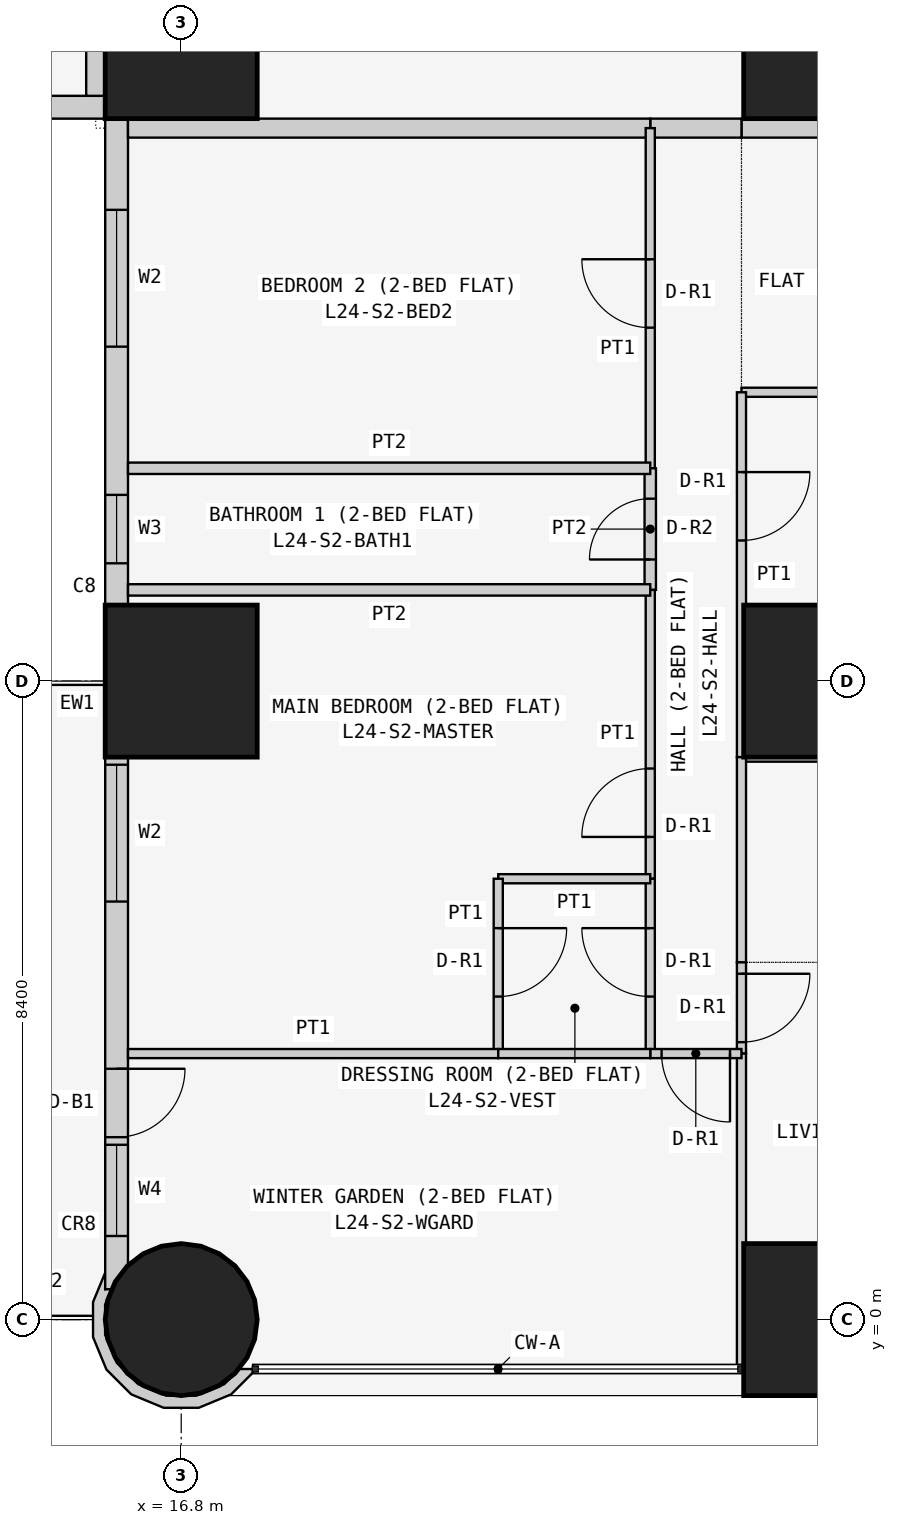
"""IFC4 building model, lengths in metres.
Left out: names, types, materials, properties, quantities, classifications, styles, units other than length and angle.
Written with IfcOpenShell. Run it as: python <this file> out.ifc"""

import sys

from ifc_helpers import new_model, si_unit, direction, frame, frame_2d, origin, origin_2d, place, context, subcontext, project, spatial, polyline, rectangle, circle, outline, extrude, element, fill, save


model = new_model("IFC4")
c1 = context("Model", 3, precision=1e-05, world=origin(), true_north=direction((0.0, 1.0)))
c2 = subcontext(c1, "Body", "Model", "MODEL_VIEW")
j1 = project(units=[si_unit("LENGTHUNIT", "METRE"), si_unit("PLANEANGLEUNIT", "RADIAN")], contexts=[c1])
p1 = place(None, origin())
s1 = spatial("IfcSite", under=j1, at=p1, CompositionType="ELEMENT")
p2 = place(p1, origin())
s2 = spatial("IfcBuilding", under=s1, at=p2, CompositionType="ELEMENT")
p3 = place(p2, frame((0.0, 0.0, 95.7)))
s3 = spatial("IfcBuildingStorey", under=s2, at=p3, CompositionType="ELEMENT", Elevation=95.7)
p4 = place(p3, frame((16.8, 0.0, 0.0), z_axis=(0.0, 0.0, 1.0), x_axis=(1.0, 0.0, 0.0)))
e1 = element("IfcColumn", 1, at=p4, inside=s3, PredefinedType="COLUMN", context=c2, shape_type="SweptSolid", body=[
    extrude(circle(Radius=1.0, at=origin_2d()), origin(), (0.0, 0.0, 1.0), 3.6),
])
for number, where, z_axis, x_axis in (
    (2, (16.8, 8.4, 0.0), (0.0, 0.0, 1.0), (1.0, 0.0, 0.0)),
    (3, (16.8, 16.8, 0.0), (0.0, 0.0, 1.0), (1.0, 0.0, 0.0)),
    (4, (25.2, 0.0, 0.0), (0.0, 0.0, 1.0), (1.0, 0.0, 0.0)),
    (5, (25.2, 8.4, 0.0), (0.0, 0.0, 1.0), (1.0, 0.0, 0.0)),
    (6, (25.2, 16.8, 0.0), (0.0, 0.0, 1.0), (1.0, 0.0, 0.0)),
):
    element("IfcColumn", number, at=place(p3, frame(where, z_axis=z_axis, x_axis=x_axis)), inside=s3, PredefinedType="COLUMN", context=c2, shape_type="SweptSolid", body=[
        extrude(rectangle(XDim=2.0, YDim=2.0, at=origin_2d()), origin(), (0.0, 0.0, 1.0), 3.6),
    ])
p5 = place(p3, frame((0.4, 15.95, 0.0), z_axis=(0.0, 0.0, 1.0), x_axis=(1.0, 0.0, 0.0)))
e7 = element("IfcWall", 7, at=p5, inside=s3, PredefinedType="SOLIDWALL", context=c2, shape_type="SweptSolid", body=[
    extrude(rectangle(XDim=15.7, YDim=0.3, at=frame_2d((7.85, 0.0))), origin(), (0.0, 0.0, 1.0), 3.45),
])
p6 = place(p5, frame((12.4, 0.0, 0.9)))
e8 = element("IfcOpeningElement", 8, at=p6, cuts=e7, PredefinedType="OPENING", context=c2, shape_type="SweptSolid", body=[
    extrude(rectangle(XDim=1.8, YDim=1.5, at=frame_2d((0.9, 0.75))), frame((0.0, 0.16, 0.0), z_axis=(0.0, -1.0, 0.0), x_axis=(1.0, 0.0, 0.0)), (0.0, 0.0, 1.0), 0.32),
])
p7 = place(p5, frame((9.55, 0.0, 1.5)))
e9 = element("IfcOpeningElement", 9, at=p7, cuts=e7, PredefinedType="OPENING", context=c2, shape_type="SweptSolid", body=[
    extrude(rectangle(XDim=0.9, YDim=0.7, at=frame_2d((0.45, 0.35))), frame((0.0, 0.16, 0.0), z_axis=(0.0, -1.0, 0.0), x_axis=(1.0, 0.0, 0.0)), (0.0, 0.0, 1.0), 0.32),
])
p8 = place(p5, frame((5.1, 0.0, 0.9)))
e10 = element("IfcOpeningElement", 10, at=p8, cuts=e7, PredefinedType="OPENING", context=c2, shape_type="SweptSolid", body=[
    extrude(rectangle(XDim=1.8, YDim=1.5, at=frame_2d((0.9, 0.75))), frame((0.0, 0.16, 0.0), z_axis=(0.0, -1.0, 0.0), x_axis=(1.0, 0.0, 0.0)), (0.0, 0.0, 1.0), 0.32),
])
p9 = place(p5, frame((2.0, 0.0, 0.0)))
e11 = element("IfcOpeningElement", 11, at=p9, cuts=e7, PredefinedType="OPENING", context=c2, shape_type="SweptSolid", body=[
    extrude(rectangle(XDim=0.9, YDim=2.4, at=frame_2d((0.45, 1.2))), frame((0.0, 0.16, 0.0), z_axis=(0.0, -1.0, 0.0), x_axis=(1.0, 0.0, 0.0)), (0.0, 0.0, 1.0), 0.32),
])
p10 = place(p5, frame((0.7, 0.0, 0.9)))
e12 = element("IfcOpeningElement", 12, at=p10, cuts=e7, PredefinedType="OPENING", context=c2, shape_type="SweptSolid", body=[
    extrude(rectangle(XDim=1.2, YDim=1.5, at=frame_2d((0.6, 0.75))), frame((0.0, 0.16, 0.0), z_axis=(0.0, -1.0, 0.0), x_axis=(1.0, 0.0, 0.0)), (0.0, 0.0, 1.0), 0.32),
])
p11 = place(p3, frame((15.95, 15.8, 0.0), z_axis=(0.0, 0.0, 1.0), x_axis=(0.0, -1.0, 0.0)))
e13 = element("IfcWall", 13, at=p11, inside=s3, PredefinedType="SOLIDWALL", context=c2, shape_type="SweptSolid", body=[
    extrude(rectangle(XDim=15.4, YDim=0.3, at=frame_2d((7.7, 0.0))), origin(), (0.0, 0.0, 1.0), 3.45),
])
p12 = place(p11, frame((1.2, 0.0, 0.9)))
e14 = element("IfcOpeningElement", 14, at=p12, cuts=e13, PredefinedType="OPENING", context=c2, shape_type="SweptSolid", body=[
    extrude(rectangle(XDim=1.8, YDim=1.5, at=frame_2d((0.9, 0.75))), frame((0.0, 0.16, 0.0), z_axis=(0.0, -1.0, 0.0), x_axis=(1.0, 0.0, 0.0)), (0.0, 0.0, 1.0), 0.32),
])
p13 = place(p11, frame((4.95, 0.0, 1.5)))
e15 = element("IfcOpeningElement", 15, at=p13, cuts=e13, PredefinedType="OPENING", context=c2, shape_type="SweptSolid", body=[
    extrude(rectangle(XDim=0.9, YDim=0.7, at=frame_2d((0.45, 0.35))), frame((0.0, 0.16, 0.0), z_axis=(0.0, -1.0, 0.0), x_axis=(1.0, 0.0, 0.0)), (0.0, 0.0, 1.0), 0.32),
])
p14 = place(p11, frame((8.5, 0.0, 0.9)))
e16 = element("IfcOpeningElement", 16, at=p14, cuts=e13, PredefinedType="OPENING", context=c2, shape_type="SweptSolid", body=[
    extrude(rectangle(XDim=1.8, YDim=1.5, at=frame_2d((0.9, 0.75))), frame((0.0, 0.16, 0.0), z_axis=(0.0, -1.0, 0.0), x_axis=(1.0, 0.0, 0.0)), (0.0, 0.0, 1.0), 0.32),
])
p15 = place(p11, frame((12.5, 0.0, 0.0)))
e17 = element("IfcOpeningElement", 17, at=p15, cuts=e13, PredefinedType="OPENING", context=c2, shape_type="SweptSolid", body=[
    extrude(rectangle(XDim=0.9, YDim=2.4, at=frame_2d((0.45, 1.2))), frame((0.0, 0.16, 0.0), z_axis=(0.0, -1.0, 0.0), x_axis=(1.0, 0.0, 0.0)), (0.0, 0.0, 1.0), 0.32),
])
p16 = place(p11, frame((13.5, 0.0, 0.9)))
e18 = element("IfcOpeningElement", 18, at=p16, cuts=e13, PredefinedType="OPENING", context=c2, shape_type="SweptSolid", body=[
    extrude(rectangle(XDim=1.2, YDim=1.5, at=frame_2d((0.6, 0.75))), frame((0.0, 0.16, 0.0), z_axis=(0.0, -1.0, 0.0), x_axis=(1.0, 0.0, 0.0)), (0.0, 0.0, 1.0), 0.32),
])
p17 = place(p3, frame((15.881, 0.567, 0.0), z_axis=(0.0, 0.0, 1.0), x_axis=(-0.555974394895, -0.831199417842, 0.0)))
e19 = element("IfcWall", 19, at=p17, inside=s3, PredefinedType="SOLIDWALL", context=c2, shape_type="SweptSolid", body=[
    extrude(outline(polyline([(0.075, 2.077), (0.351, 2.022), (0.682, 1.801), (0.903, 1.47), (0.981, 1.08), (0.903, 0.689), (0.682, 0.358), (0.351, 0.137), (0.126, 0.092), (0.184, 0.026), (0.004, -0.095), (0.414, -0.013), (0.797, 0.243), (1.053, 0.627), (1.143, 1.08), (1.053, 1.532), (0.796, 1.916), (0.412, 2.172), (0.017, 2.251), (-0.023, 2.224), (0.075, 2.077)])), origin(), (0.0, 0.0, 1.0), 3.45),
])
p18 = place(p3, frame((29.4, 15.675, 0.0), z_axis=(0.0, 0.0, 1.0), x_axis=(-1.0, 0.0, 0.0)))
e20 = element("IfcWall", 20, at=p18, inside=s3, PredefinedType="PARTITIONING", context=c2, shape_type="SweptSolid", body=[
    extrude(rectangle(XDim=5.229, YDim=0.25, at=frame_2d((2.615, 0.0))), origin(), (0.0, 0.0, 1.0), 3.45),
])
p19 = place(p18, frame((2.05, 0.0, 0.0)))
e21 = element("IfcOpeningElement", 21, at=p19, cuts=e20, PredefinedType="OPENING", context=c2, shape_type="SweptSolid", body=[
    extrude(rectangle(XDim=1.0, YDim=2.1, at=frame_2d((0.5, 1.05))), frame((0.0, 0.135, 0.0), z_axis=(0.0, -1.0, 0.0), x_axis=(1.0, 0.0, 0.0)), (0.0, 0.0, 1.0), 0.27),
])
p20 = place(p3, frame((24.171, 15.675, 0.0), z_axis=(0.0, 0.0, 1.0), x_axis=(-1.0, 0.0, 0.0)))
e22 = element("IfcWall", 22, at=p20, inside=s3, PredefinedType="PARTITIONING", context=c2, shape_type="SweptSolid", body=[
    extrude(rectangle(XDim=1.2, YDim=0.25, at=frame_2d((0.6, 0.0))), origin(), (0.0, 0.0, 1.0), 3.45),
])
p21 = place(p3, frame((22.971, 15.675, 0.0), z_axis=(0.0, 0.0, 1.0), x_axis=(-1.0, 0.0, 0.0)))
e23 = element("IfcWall", 23, at=p21, inside=s3, PredefinedType="PARTITIONING", context=c2, shape_type="SweptSolid", body=[
    extrude(rectangle(XDim=6.871, YDim=0.25, at=frame_2d((3.436, 0.0))), origin(), (0.0, 0.0, 1.0), 3.45),
])
p22 = place(p3, frame((15.675, 16.1, 0.0), z_axis=(0.0, 0.0, 1.0), x_axis=(0.0, 1.0, 0.0)))
e24 = element("IfcWall", 24, at=p22, inside=s3, PredefinedType="PARTITIONING", context=c2, shape_type="SweptSolid", body=[
    extrude(rectangle(XDim=6.471, YDim=0.25, at=frame_2d((3.235, 0.0))), origin(), (0.0, 0.0, 1.0), 3.45),
])
for number, where, z_axis, x_axis in (
    (25, (29.4, 12.2, 0.0), (0.0, 0.0, 1.0), (-1.0, 0.0, 0.0)),
    (26, (29.4, 7.4, 0.0), (0.0, 0.0, 1.0), (-1.0, 0.0, 0.0)),
):
    element("IfcWall", number, at=place(p3, frame(where, z_axis=z_axis, x_axis=x_axis)), inside=s3, PredefinedType="PARTITIONING", context=c2, shape_type="SweptSolid", body=[
        extrude(rectangle(XDim=5.229, YDim=0.12, at=frame_2d((2.615, 0.0))), origin(), (0.0, 0.0, 1.0), 3.45),
    ])
p23 = place(p3, frame((24.171, 7.4, 0.0), z_axis=(0.0, 0.0, 1.0), x_axis=(0.0, 1.0, 0.0)))
e27 = element("IfcWall", 27, at=p23, inside=s3, PredefinedType="PARTITIONING", context=c2, shape_type="SweptSolid", body=[
    extrude(rectangle(XDim=4.8, YDim=0.12, at=frame_2d((2.4, 0.0))), origin(), (0.0, 0.0, 1.0), 3.45),
])
p24 = place(p23, frame((2.85, 0.0, 0.0)))
e28 = element("IfcOpeningElement", 28, at=p24, cuts=e27, PredefinedType="OPENING", context=c2, shape_type="SweptSolid", body=[
    extrude(rectangle(XDim=0.9, YDim=2.1, at=frame_2d((0.45, 1.05))), frame((0.0, 0.07, 0.0), z_axis=(0.0, -1.0, 0.0), x_axis=(1.0, 0.0, 0.0)), (0.0, 0.0, 1.0), 0.14),
])
p25 = place(p3, frame((24.171, 4.7, 0.0), z_axis=(0.0, 0.0, 1.0), x_axis=(0.0, 1.0, 0.0)))
e29 = element("IfcWall", 29, at=p25, inside=s3, PredefinedType="PARTITIONING", context=c2, shape_type="SweptSolid", body=[
    extrude(rectangle(XDim=2.7, YDim=0.12, at=frame_2d((1.35, 0.0))), origin(), (0.0, 0.0, 1.0), 3.45),
])
p26 = place(p3, frame((24.171, 3.5, 0.0), z_axis=(0.0, 0.0, 1.0), x_axis=(0.0, 1.0, 0.0)))
e30 = element("IfcWall", 30, at=p26, inside=s3, PredefinedType="PARTITIONING", context=c2, shape_type="SweptSolid", body=[
    extrude(rectangle(XDim=1.2, YDim=0.12, at=frame_2d((0.6, 0.0))), origin(), (0.0, 0.0, 1.0), 3.45),
])
p27 = place(p26, frame((0.15, 0.0, 0.0)))
e31 = element("IfcOpeningElement", 31, at=p27, cuts=e30, PredefinedType="OPENING", context=c2, shape_type="SweptSolid", body=[
    extrude(rectangle(XDim=0.9, YDim=2.1, at=frame_2d((0.45, 1.05))), frame((0.0, 0.07, 0.0), z_axis=(0.0, -1.0, 0.0), x_axis=(1.0, 0.0, 0.0)), (0.0, 0.0, 1.0), 0.14),
])
p28 = place(p3, frame((24.171, -0.65, 0.0), z_axis=(0.0, 0.0, 1.0), x_axis=(0.0, 1.0, 0.0)))
e32 = element("IfcWall", 32, at=p28, inside=s3, PredefinedType="PARTITIONING", context=c2, shape_type="SweptSolid", body=[
    extrude(rectangle(XDim=4.15, YDim=0.12, at=frame_2d((2.075, 0.0))), origin(), (0.0, 0.0, 1.0), 3.45),
])
p29 = place(p3, frame((22.971, 11.2, 0.0), z_axis=(0.0, 0.0, 1.0), x_axis=(0.0, 1.0, 0.0)))
e33 = element("IfcWall", 33, at=p29, inside=s3, PredefinedType="PARTITIONING", context=c2, shape_type="SweptSolid", body=[
    extrude(rectangle(XDim=4.475, YDim=0.12, at=frame_2d((2.238, 0.0))), origin(), (0.0, 0.0, 1.0), 3.45),
])
p30 = place(p29, frame((1.85, 0.0, 0.0)))
e34 = element("IfcOpeningElement", 34, at=p30, cuts=e33, PredefinedType="OPENING", context=c2, shape_type="SweptSolid", body=[
    extrude(rectangle(XDim=0.9, YDim=2.1, at=frame_2d((0.45, 1.05))), frame((0.0, 0.07, 0.0), z_axis=(0.0, -1.0, 0.0), x_axis=(1.0, 0.0, 0.0)), (0.0, 0.0, 1.0), 0.14),
])
p31 = place(p3, frame((22.971, 9.6, 0.0), z_axis=(0.0, 0.0, 1.0), x_axis=(0.0, 1.0, 0.0)))
e35 = element("IfcWall", 35, at=p31, inside=s3, PredefinedType="PARTITIONING", context=c2, shape_type="SweptSolid", body=[
    extrude(rectangle(XDim=1.6, YDim=0.15, at=frame_2d((0.8, 0.0))), origin(), (0.0, 0.0, 1.0), 3.45),
])
p32 = place(p31, frame((0.4, 0.0, 0.0)))
e36 = element("IfcOpeningElement", 36, at=p32, cuts=e35, PredefinedType="OPENING", context=c2, shape_type="SweptSolid", body=[
    extrude(rectangle(XDim=0.8, YDim=2.1, at=frame_2d((0.4, 1.05))), frame((0.0, 0.085, 0.0), z_axis=(0.0, -1.0, 0.0), x_axis=(1.0, 0.0, 0.0)), (0.0, 0.0, 1.0), 0.17),
])
p33 = place(p3, frame((22.971, 5.8, 0.0), z_axis=(0.0, 0.0, 1.0), x_axis=(0.0, 1.0, 0.0)))
e37 = element("IfcWall", 37, at=p33, inside=s3, PredefinedType="PARTITIONING", context=c2, shape_type="SweptSolid", body=[
    extrude(rectangle(XDim=3.8, YDim=0.12, at=frame_2d((1.9, 0.0))), origin(), (0.0, 0.0, 1.0), 3.45),
])
p34 = place(p33, frame((0.55, 0.0, 0.0)))
e38 = element("IfcOpeningElement", 38, at=p34, cuts=e37, PredefinedType="OPENING", context=c2, shape_type="SweptSolid", body=[
    extrude(rectangle(XDim=0.9, YDim=2.1, at=frame_2d((0.45, 1.05))), frame((0.0, 0.07, 0.0), z_axis=(0.0, -1.0, 0.0), x_axis=(1.0, 0.0, 0.0)), (0.0, 0.0, 1.0), 0.14),
])
p35 = place(p3, frame((22.971, 3.5, 0.0), z_axis=(0.0, 0.0, 1.0), x_axis=(0.0, 1.0, 0.0)))
e39 = element("IfcWall", 39, at=p35, inside=s3, PredefinedType="PARTITIONING", context=c2, shape_type="SweptSolid", body=[
    extrude(rectangle(XDim=2.3, YDim=0.12, at=frame_2d((1.15, 0.0))), origin(), (0.0, 0.0, 1.0), 3.45),
])
p36 = place(p35, frame((0.75, 0.0, 0.0)))
e40 = element("IfcOpeningElement", 40, at=p36, cuts=e39, PredefinedType="OPENING", context=c2, shape_type="SweptSolid", body=[
    extrude(rectangle(XDim=0.9, YDim=2.1, at=frame_2d((0.45, 1.05))), frame((0.0, 0.07, 0.0), z_axis=(0.0, -1.0, 0.0), x_axis=(1.0, 0.0, 0.0)), (0.0, 0.0, 1.0), 0.14),
])
p37 = place(p3, frame((24.171, 3.5, 0.0), z_axis=(0.0, 0.0, 1.0), x_axis=(-1.0, 0.0, 0.0)))
e41 = element("IfcWall", 41, at=p37, inside=s3, PredefinedType="PARTITIONING", context=c2, shape_type="SweptSolid", body=[
    extrude(rectangle(XDim=1.2, YDim=0.12, at=frame_2d((0.6, 0.0))), origin(), (0.0, 0.0, 1.0), 3.45),
])
p38 = place(p37, frame((0.151, 0.0, 0.0)))
e42 = element("IfcOpeningElement", 42, at=p38, cuts=e41, PredefinedType="OPENING", context=c2, shape_type="SweptSolid", body=[
    extrude(rectangle(XDim=0.9, YDim=2.1, at=frame_2d((0.45, 1.05))), frame((0.0, 0.07, 0.0), z_axis=(0.0, -1.0, 0.0), x_axis=(1.0, 0.0, 0.0)), (0.0, 0.0, 1.0), 0.14),
])
for number, where, z_axis, x_axis in (
    (43, (22.971, 11.2, 0.0), (0.0, 0.0, 1.0), (-1.0, 0.0, 0.0)),
    (44, (22.971, 9.6, 0.0), (0.0, 0.0, 1.0), (-1.0, 0.0, 0.0)),
):
    element("IfcWall", number, at=place(p3, frame(where, z_axis=z_axis, x_axis=x_axis)), inside=s3, PredefinedType="PARTITIONING", context=c2, shape_type="SweptSolid", body=[
        extrude(rectangle(XDim=6.871, YDim=0.15, at=frame_2d((3.436, 0.0))), origin(), (0.0, 0.0, 1.0), 3.45),
    ])
p39 = place(p3, frame((22.971, 5.8, 0.0), z_axis=(0.0, 0.0, 1.0), x_axis=(-1.0, 0.0, 0.0)))
e45 = element("IfcWall", 45, at=p39, inside=s3, PredefinedType="PARTITIONING", context=c2, shape_type="SweptSolid", body=[
    extrude(rectangle(XDim=2.0, YDim=0.12, at=frame_2d((1.0, 0.0))), origin(), (0.0, 0.0, 1.0), 3.45),
])
p40 = place(p3, frame((20.971, 5.8, 0.0), z_axis=(0.0, 0.0, 1.0), x_axis=(0.0, -1.0, 0.0)))
e46 = element("IfcWall", 46, at=p40, inside=s3, PredefinedType="PARTITIONING", context=c2, shape_type="SweptSolid", body=[
    extrude(rectangle(XDim=2.3, YDim=0.12, at=frame_2d((1.15, 0.0))), origin(), (0.0, 0.0, 1.0), 2.848),
])
p41 = place(p40, frame((0.65, 0.0, 0.0)))
e47 = element("IfcOpeningElement", 47, at=p41, cuts=e46, PredefinedType="OPENING", context=c2, shape_type="SweptSolid", body=[
    extrude(rectangle(XDim=0.9, YDim=2.1, at=frame_2d((0.45, 1.05))), frame((0.0, 0.07, 0.0), z_axis=(0.0, -1.0, 0.0), x_axis=(1.0, 0.0, 0.0)), (0.0, 0.0, 1.0), 0.14),
])
p42 = place(p3, frame((20.971, 3.5, 0.0), z_axis=(0.0, 0.0, 1.0), x_axis=(-1.0, 0.0, 0.0)))
e48 = element("IfcWall", 48, at=p42, inside=s3, PredefinedType="PARTITIONING", context=c2, shape_type="SweptSolid", body=[
    extrude(rectangle(XDim=4.871, YDim=0.12, at=frame_2d((2.436, 0.0))), origin(), (0.0, 0.0, 1.0), 3.45),
])
p43 = place(p3, frame((22.971, 3.5, 0.0), z_axis=(0.0, 0.0, 1.0), x_axis=(-1.0, 0.0, 0.0)))
e49 = element("IfcWall", 49, at=p43, inside=s3, PredefinedType="PARTITIONING", context=c2, shape_type="SweptSolid", body=[
    extrude(rectangle(XDim=2.0, YDim=0.12, at=frame_2d((1.0, 0.0))), origin(), (0.0, 0.0, 1.0), 3.45),
])
p44 = place(p12, origin())
e50 = element("IfcWindow", 50, at=p44, inside=s3, PartitioningType="SINGLE_PANEL", PredefinedType="WINDOW", context=c2, shape_type="SweptSolid", body=[
    extrude(rectangle(XDim=1.8, YDim=1.5, at=frame_2d((0.9, 0.75))), frame((0.0, 0.03, 0.0), z_axis=(0.0, -1.0, 0.0), x_axis=(1.0, 0.0, 0.0)), (0.0, 0.0, 1.0), 0.06),
])
fill(e14, e50)
p45 = place(p13, origin())
e51 = element("IfcWindow", 51, at=p45, inside=s3, PartitioningType="SINGLE_PANEL", PredefinedType="WINDOW", context=c2, shape_type="SweptSolid", body=[
    extrude(rectangle(XDim=0.9, YDim=0.7, at=frame_2d((0.45, 0.35))), frame((0.0, 0.03, 0.0), z_axis=(0.0, -1.0, 0.0), x_axis=(1.0, 0.0, 0.0)), (0.0, 0.0, 1.0), 0.06),
])
fill(e15, e51)
p46 = place(p14, origin())
e52 = element("IfcWindow", 52, at=p46, inside=s3, PartitioningType="SINGLE_PANEL", PredefinedType="WINDOW", context=c2, shape_type="SweptSolid", body=[
    extrude(rectangle(XDim=1.8, YDim=1.5, at=frame_2d((0.9, 0.75))), frame((0.0, 0.03, 0.0), z_axis=(0.0, -1.0, 0.0), x_axis=(1.0, 0.0, 0.0)), (0.0, 0.0, 1.0), 0.06),
])
fill(e16, e52)
p47 = place(p15, origin())
e53 = element("IfcDoor", 53, at=p47, inside=s3, OperationType="SINGLE_SWING_LEFT", PredefinedType="DOOR", context=c2, shape_type="SweptSolid", body=[
    extrude(rectangle(XDim=0.9, YDim=2.4, at=frame_2d((0.45, 1.2))), frame((0.0, 0.025, 0.0), z_axis=(0.0, -1.0, 0.0), x_axis=(1.0, 0.0, 0.0)), (0.0, 0.0, 1.0), 0.05),
])
fill(e17, e53)
p48 = place(p16, origin())
e54 = element("IfcWindow", 54, at=p48, inside=s3, PartitioningType="SINGLE_PANEL", PredefinedType="WINDOW", context=c2, shape_type="SweptSolid", body=[
    extrude(rectangle(XDim=1.2, YDim=1.5, at=frame_2d((0.6, 0.75))), frame((0.0, 0.03, 0.0), z_axis=(0.0, -1.0, 0.0), x_axis=(1.0, 0.0, 0.0)), (0.0, 0.0, 1.0), 0.06),
])
fill(e18, e54)
p49 = place(p24, frame((0.9, 0.0, 0.0), z_axis=(0.0, 0.0, 1.0), x_axis=(-1.0, 0.0, 0.0)))
e55 = element("IfcDoor", 55, at=p49, inside=s3, OperationType="SINGLE_SWING_LEFT", PredefinedType="DOOR", context=c2, shape_type="SweptSolid", body=[
    extrude(rectangle(XDim=0.9, YDim=2.1, at=frame_2d((0.45, 1.05))), frame((0.0, 0.025, 0.0), z_axis=(0.0, -1.0, 0.0), x_axis=(1.0, 0.0, 0.0)), (0.0, 0.0, 1.0), 0.05),
])
fill(e28, e55)
p50 = place(p27, frame((0.9, 0.0, 0.0), z_axis=(0.0, 0.0, 1.0), x_axis=(-1.0, 0.0, 0.0)))
e56 = element("IfcDoor", 56, at=p50, inside=s3, OperationType="SINGLE_SWING_LEFT", PredefinedType="DOOR", context=c2, shape_type="SweptSolid", body=[
    extrude(rectangle(XDim=0.9, YDim=2.1, at=frame_2d((0.45, 1.05))), frame((0.0, 0.025, 0.0), z_axis=(0.0, -1.0, 0.0), x_axis=(1.0, 0.0, 0.0)), (0.0, 0.0, 1.0), 0.05),
])
fill(e31, e56)
p51 = place(p30, origin())
e57 = element("IfcDoor", 57, at=p51, inside=s3, OperationType="SINGLE_SWING_RIGHT", PredefinedType="DOOR", context=c2, shape_type="SweptSolid", body=[
    extrude(rectangle(XDim=0.9, YDim=2.1, at=frame_2d((0.45, 1.05))), frame((0.0, 0.025, 0.0), z_axis=(0.0, -1.0, 0.0), x_axis=(1.0, 0.0, 0.0)), (0.0, 0.0, 1.0), 0.05),
])
fill(e34, e57)
p52 = place(p32, origin())
e58 = element("IfcDoor", 58, at=p52, inside=s3, OperationType="SINGLE_SWING_LEFT", PredefinedType="DOOR", context=c2, shape_type="SweptSolid", body=[
    extrude(rectangle(XDim=0.8, YDim=2.1, at=frame_2d((0.4, 1.05))), frame((0.0, 0.025, 0.0), z_axis=(0.0, -1.0, 0.0), x_axis=(1.0, 0.0, 0.0)), (0.0, 0.0, 1.0), 0.05),
])
fill(e36, e58)
p53 = place(p34, origin())
e59 = element("IfcDoor", 59, at=p53, inside=s3, OperationType="SINGLE_SWING_LEFT", PredefinedType="DOOR", context=c2, shape_type="SweptSolid", body=[
    extrude(rectangle(XDim=0.9, YDim=2.1, at=frame_2d((0.45, 1.05))), frame((0.0, 0.025, 0.0), z_axis=(0.0, -1.0, 0.0), x_axis=(1.0, 0.0, 0.0)), (0.0, 0.0, 1.0), 0.05),
])
fill(e38, e59)
p54 = place(p36, origin())
e60 = element("IfcDoor", 60, at=p54, inside=s3, OperationType="SINGLE_SWING_RIGHT", PredefinedType="DOOR", context=c2, shape_type="SweptSolid", body=[
    extrude(rectangle(XDim=0.9, YDim=2.1, at=frame_2d((0.45, 1.05))), frame((0.0, 0.025, 0.0), z_axis=(0.0, -1.0, 0.0), x_axis=(1.0, 0.0, 0.0)), (0.0, 0.0, 1.0), 0.05),
])
fill(e40, e60)
p55 = place(p41, origin())
e61 = element("IfcDoor", 61, at=p55, inside=s3, OperationType="SINGLE_SWING_LEFT", PredefinedType="DOOR", context=c2, shape_type="SweptSolid", body=[
    extrude(rectangle(XDim=0.9, YDim=2.1, at=frame_2d((0.45, 1.05))), frame((0.0, 0.025, 0.0), z_axis=(0.0, -1.0, 0.0), x_axis=(1.0, 0.0, 0.0)), (0.0, 0.0, 1.0), 0.05),
])
fill(e47, e61)
p56 = place(p38, origin())
e62 = element("IfcDoor", 62, at=p56, inside=s3, OperationType="SINGLE_SWING_LEFT", PredefinedType="DOOR", context=c2, shape_type="SweptSolid", body=[
    extrude(rectangle(XDim=0.9, YDim=2.1, at=frame_2d((0.45, 1.05))), frame((0.0, 0.025, 0.0), z_axis=(0.0, -1.0, 0.0), x_axis=(1.0, 0.0, 0.0)), (0.0, 0.0, 1.0), 0.05),
])
fill(e42, e62)
save(model, sys.argv[1])
